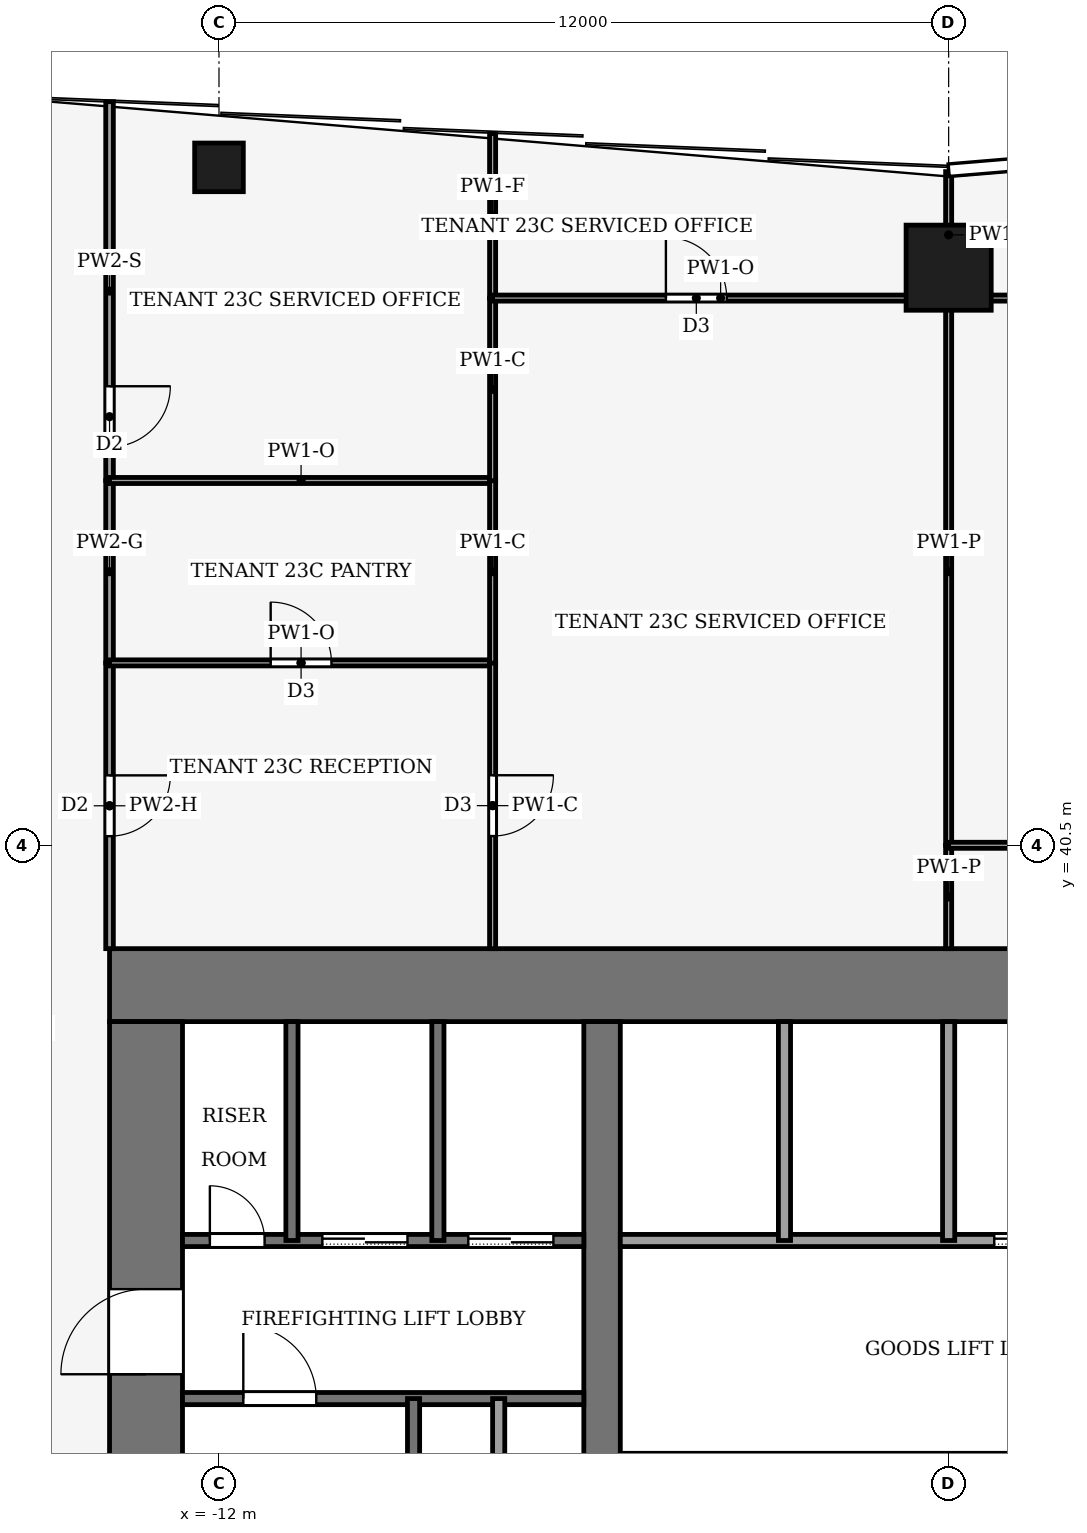
"""IFC4 building model, lengths in metres.
Left out: names, types, materials, properties, quantities, classifications, styles, units other than length and angle.
Written with IfcOpenShell. Run it as: python <this file> out.ifc"""

import sys

from ifc_helpers import new_model, si_unit, direction, frame, frame_2d, origin, origin_2d, place, context, subcontext, project, spatial, rectangle, hollow_rectangle, extrude, element, fill, save


model = new_model("IFC4")
c1 = context("Model", 3, precision=1e-05, world=origin(), true_north=direction((0.0, 1.0)))
c2 = subcontext(c1, "Body", "Model", "MODEL_VIEW")
j1 = project(units=[si_unit("LENGTHUNIT", "METRE"), si_unit("PLANEANGLEUNIT", "RADIAN")], contexts=[c1])
p1 = place(None, origin())
s1 = spatial("IfcSite", under=j1, at=p1, CompositionType="ELEMENT")
p2 = place(p1, origin())
s2 = spatial("IfcBuilding", under=s1, at=p2, CompositionType="ELEMENT")
p3 = place(p2, frame((0.0, 0.0, 102.0)))
s3 = spatial("IfcBuildingStorey", under=s2, at=p3, CompositionType="ELEMENT", Elevation=102.0)
p4 = place(p3, frame((-13.8, 38.2, -0.13), z_axis=(0.0, 0.0, 1.0), x_axis=(1.0, 0.0, 0.0)))
e1 = element("IfcWall", 1, at=p4, inside=s3, PredefinedType="SHEAR", context=c2, shape_type="SweptSolid", body=[
    extrude(rectangle(XDim=27.6, YDim=1.2, at=frame_2d((13.8, 0.0))), origin(), (0.0, 0.0, 1.0), 4.0),
])
p5 = place(p3, frame((-13.2, 18.4, -0.13), z_axis=(0.0, 0.0, 1.0), x_axis=(0.0, 1.0, 0.0)))
e2 = element("IfcWall", 2, at=p5, inside=s3, PredefinedType="SHEAR", context=c2, shape_type="SweptSolid", body=[
    extrude(rectangle(XDim=19.2, YDim=1.2, at=frame_2d((9.6, 0.0))), origin(), (0.0, 0.0, 1.0), 4.0),
])
p6 = place(p5, frame((2.8, 0.0, 0.13)))
e3 = element("IfcOpeningElement", 3, at=p6, cuts=e2, PredefinedType="OPENING", context=c2, shape_type="SweptSolid", body=[
    extrude(rectangle(XDim=2.4, YDim=2.4, at=frame_2d((1.2, 1.2))), frame((0.0, 0.61, 0.0), z_axis=(0.0, -1.0, 0.0), x_axis=(1.0, 0.0, 0.0)), (0.0, 0.0, 1.0), 1.22),
])
p7 = place(p5, frame((13.4, 0.0, 0.13)))
e4 = element("IfcOpeningElement", 4, at=p7, cuts=e2, PredefinedType="OPENING", context=c2, shape_type="SweptSolid", body=[
    extrude(rectangle(XDim=1.4, YDim=2.2, at=frame_2d((0.7, 1.1))), frame((0.0, 0.61, 0.0), z_axis=(0.0, -1.0, 0.0), x_axis=(1.0, 0.0, 0.0)), (0.0, 0.0, 1.0), 1.22),
])
p8 = place(p3, frame((-5.7, 18.4, -0.13), z_axis=(0.0, 0.0, 1.0), x_axis=(0.0, 1.0, 0.0)))
e5 = element("IfcWall", 5, at=p8, inside=s3, PredefinedType="SHEAR", context=c2, shape_type="SweptSolid", body=[
    extrude(rectangle(XDim=19.2, YDim=0.6, at=frame_2d((9.6, 0.0))), origin(), (0.0, 0.0, 1.0), 4.0),
])
p9 = place(p8, frame((8.35, 0.0, 0.13)))
e6 = element("IfcOpeningElement", 6, at=p9, cuts=e5, PredefinedType="OPENING", context=c2, shape_type="SweptSolid", body=[
    extrude(rectangle(XDim=0.9, YDim=2.1, at=frame_2d((0.45, 1.05))), frame((0.0, 0.31, 0.0), z_axis=(0.0, -1.0, 0.0), x_axis=(1.0, 0.0, 0.0)), (0.0, 0.0, 1.0), 0.62),
])
p10 = place(p3, frame((0.0, 50.0, 0.0), z_axis=(0.0, 0.0, 1.0), x_axis=(1.0, 0.0, 0.0)))
e7 = element("IfcColumn", 7, at=p10, inside=s3, PredefinedType="COLUMN", context=c2, shape_type="SweptSolid", body=[
    extrude(hollow_rectangle(XDim=1.4, YDim=1.4, WallThickness=0.08, at=origin_2d()), origin(), (0.0, 0.0, 1.0), 4.0),
])
p11 = place(p3, frame((-12.0, 51.65, 0.0), z_axis=(0.0, 0.0, 1.0), x_axis=(1.0, 0.0, 0.0)))
e8 = element("IfcColumn", 8, at=p11, inside=s3, PredefinedType="COLUMN", context=c2, shape_type="SweptSolid", body=[
    extrude(hollow_rectangle(XDim=0.8, YDim=0.8, WallThickness=0.04, at=origin_2d()), origin(), (0.0, 0.0, 1.0), 4.0),
])
p12 = place(p3, frame((-12.6, 31.4, 0.0), z_axis=(0.0, 0.0, 1.0), x_axis=(1.0, 0.0, 0.0)))
e9 = element("IfcWall", 9, at=p12, inside=s3, PredefinedType="PARTITIONING", context=c2, shape_type="SweptSolid", body=[
    extrude(rectangle(XDim=6.6, YDim=0.2, at=frame_2d((3.3, 0.0))), origin(), (0.0, 0.0, 1.0), 3.87),
])
p13 = place(p12, frame((1.0, 0.0, 0.0)))
e10 = element("IfcOpeningElement", 10, at=p13, cuts=e9, PredefinedType="OPENING", context=c2, shape_type="SweptSolid", body=[
    extrude(rectangle(XDim=1.2, YDim=2.2, at=frame_2d((0.6, 1.1))), frame((0.0, 0.11, 0.0), z_axis=(0.0, -1.0, 0.0), x_axis=(1.0, 0.0, 0.0)), (0.0, 0.0, 1.0), 0.22),
])
p14 = place(p3, frame((-12.6, 34.0, 0.0), z_axis=(0.0, 0.0, 1.0), x_axis=(1.0, 0.0, 0.0)))
e11 = element("IfcWall", 11, at=p14, inside=s3, PredefinedType="PARTITIONING", context=c2, shape_type="SweptSolid", body=[
    extrude(rectangle(XDim=6.6, YDim=0.2, at=frame_2d((3.3, 0.0))), origin(), (0.0, 0.0, 1.0), 3.87),
])
p15 = place(p14, frame((4.7, 0.0, 0.0)))
e12 = element("IfcOpeningElement", 12, at=p15, cuts=e11, PredefinedType="OPENING", context=c2, shape_type="SweptSolid", body=[
    extrude(rectangle(XDim=1.4, YDim=2.2, at=frame_2d((0.7, 1.1))), frame((0.0, 0.11, 0.0), z_axis=(0.0, -1.0, 0.0), x_axis=(1.0, 0.0, 0.0)), (0.0, 0.0, 1.0), 0.22),
])
p16 = place(p14, frame((2.3, 0.0, 0.0)))
e13 = element("IfcOpeningElement", 13, at=p16, cuts=e11, PredefinedType="OPENING", context=c2, shape_type="SweptSolid", body=[
    extrude(rectangle(XDim=1.4, YDim=2.2, at=frame_2d((0.7, 1.1))), frame((0.0, 0.11, 0.0), z_axis=(0.0, -1.0, 0.0), x_axis=(1.0, 0.0, 0.0)), (0.0, 0.0, 1.0), 0.22),
])
p17 = place(p14, frame((0.45, 0.0, 0.0)))
e14 = element("IfcOpeningElement", 14, at=p17, cuts=e11, PredefinedType="OPENING", context=c2, shape_type="SweptSolid", body=[
    extrude(rectangle(XDim=0.9, YDim=2.1, at=frame_2d((0.45, 1.05))), frame((0.0, 0.11, 0.0), z_axis=(0.0, -1.0, 0.0), x_axis=(1.0, 0.0, 0.0)), (0.0, 0.0, 1.0), 0.22),
])
p18 = place(p3, frame((-5.4, 34.0, 0.0), z_axis=(0.0, 0.0, 1.0), x_axis=(1.0, 0.0, 0.0)))
e15 = element("IfcWall", 15, at=p18, inside=s3, PredefinedType="PARTITIONING", context=c2, shape_type="SweptSolid", body=[
    extrude(rectangle(XDim=10.8, YDim=0.2, at=frame_2d((5.4, 0.0))), origin(), (0.0, 0.0, 1.0), 3.87),
])
p19 = place(p18, frame((6.15, 0.0, 0.0)))
e16 = element("IfcOpeningElement", 16, at=p19, cuts=e15, PredefinedType="OPENING", context=c2, shape_type="SweptSolid", body=[
    extrude(rectangle(XDim=1.2, YDim=2.2, at=frame_2d((0.6, 1.1))), frame((0.0, 0.11, 0.0), z_axis=(0.0, -1.0, 0.0), x_axis=(1.0, 0.0, 0.0)), (0.0, 0.0, 1.0), 0.22),
])
p20 = place(p18, frame((8.95, 0.0, 0.0)))
e17 = element("IfcOpeningElement", 17, at=p20, cuts=e15, PredefinedType="OPENING", context=c2, shape_type="SweptSolid", body=[
    extrude(rectangle(XDim=1.0, YDim=2.1, at=frame_2d((0.5, 1.05))), frame((0.0, 0.11, 0.0), z_axis=(0.0, -1.0, 0.0), x_axis=(1.0, 0.0, 0.0)), (0.0, 0.0, 1.0), 0.22),
])
p21 = place(p3, frame((-10.8, 34.0, 0.0), z_axis=(0.0, 0.0, 1.0), x_axis=(0.0, 1.0, 0.0)))
e18 = element("IfcWall", 18, at=p21, inside=s3, PredefinedType="PARTITIONING", context=c2, shape_type="SweptSolid", body=[
    extrude(rectangle(XDim=3.6, YDim=0.2, at=frame_2d((1.8, 0.0))), origin(), (0.0, 0.0, 1.0), 3.87),
])
p22 = place(p3, frame((-8.8, 24.0, 0.0), z_axis=(0.0, 0.0, 1.0), x_axis=(0.0, 1.0, 0.0)))
e19 = element("IfcWall", 19, at=p22, inside=s3, PredefinedType="PARTITIONING", context=c2, shape_type="SweptSolid", body=[
    extrude(rectangle(XDim=7.4, YDim=0.2, at=frame_2d((3.7, 0.0))), origin(), (0.0, 0.0, 1.0), 3.87),
])
p23 = place(p3, frame((-8.4, 34.0, 0.0), z_axis=(0.0, 0.0, 1.0), x_axis=(0.0, 1.0, 0.0)))
e20 = element("IfcWall", 20, at=p23, inside=s3, PredefinedType="PARTITIONING", context=c2, shape_type="SweptSolid", body=[
    extrude(rectangle(XDim=3.6, YDim=0.2, at=frame_2d((1.8, 0.0))), origin(), (0.0, 0.0, 1.0), 3.87),
])
p24 = place(p3, frame((-7.4, 24.0, 0.0), z_axis=(0.0, 0.0, 1.0), x_axis=(0.0, 1.0, 0.0)))
e21 = element("IfcWall", 21, at=p24, inside=s3, PredefinedType="PARTITIONING", context=c2, shape_type="SweptSolid", body=[
    extrude(rectangle(XDim=7.4, YDim=0.2, at=frame_2d((3.7, 0.0))), origin(), (0.0, 0.0, 1.0), 3.87),
])
for number, where, z_axis, x_axis in (
    (22, (-2.7, 34.0, 0.0), (0.0, 0.0, 1.0), (0.0, 1.0, 0.0)),
    (23, (0.0, 34.0, 0.0), (0.0, 0.0, 1.0), (0.0, 1.0, 0.0)),
):
    element("IfcWall", number, at=place(p3, frame(where, z_axis=z_axis, x_axis=x_axis)), inside=s3, PredefinedType="PARTITIONING", context=c2, shape_type="SweptSolid", body=[
        extrude(rectangle(XDim=3.6, YDim=0.2, at=frame_2d((1.8, 0.0))), origin(), (0.0, 0.0, 1.0), 3.87),
    ])
p25 = place(p3, frame((-13.8, 43.5, 0.0), z_axis=(0.0, 0.0, 1.0), x_axis=(0.0, -1.0, 0.0)))
e24 = element("IfcWall", 24, at=p25, inside=s3, PredefinedType="PARTITIONING", context=c2, shape_type="SweptSolid", body=[
    extrude(rectangle(XDim=4.7, YDim=0.125, at=frame_2d((2.35, 0.0))), origin(), (0.0, 0.0, 1.0), 3.14),
])
p26 = place(p25, frame((1.85, 0.0, 0.0)))
e25 = element("IfcOpeningElement", 25, at=p26, cuts=e24, PredefinedType="OPENING", context=c2, shape_type="SweptSolid", body=[
    extrude(rectangle(XDim=1.0, YDim=2.1, at=frame_2d((0.5, 1.05))), frame((0.0, 0.073, 0.0), z_axis=(0.0, -1.0, 0.0), x_axis=(1.0, 0.0, 0.0)), (0.0, 0.0, 1.0), 0.145),
])
p27 = place(p3, frame((-13.8, 43.5, 0.0), z_axis=(0.0, 0.0, 1.0), x_axis=(0.0, 1.0, 0.0)))
e26 = element("IfcWall", 26, at=p27, inside=s3, PredefinedType="PARTITIONING", context=c2, shape_type="SweptSolid", body=[
    extrude(rectangle(XDim=3.0, YDim=0.125, at=frame_2d((1.5, 0.0))), origin(), (0.0, 0.0, 1.0), 3.87),
])
p28 = place(p3, frame((-13.8, 52.73, 0.0), z_axis=(0.0, 0.0, 1.0), x_axis=(0.0, -1.0, 0.0)))
e27 = element("IfcWall", 27, at=p28, inside=s3, PredefinedType="PARTITIONING", context=c2, shape_type="SweptSolid", body=[
    extrude(rectangle(XDim=6.23, YDim=0.125, at=frame_2d((3.115, 0.0))), origin(), (0.0, 0.0, 1.0), 3.04),
])
p29 = place(p28, frame((4.68, 0.0, 0.0)))
e28 = element("IfcOpeningElement", 28, at=p29, cuts=e27, PredefinedType="OPENING", context=c2, shape_type="SweptSolid", body=[
    extrude(rectangle(XDim=1.0, YDim=2.1, at=frame_2d((0.5, 1.05))), frame((0.0, 0.073, 0.0), z_axis=(0.0, -1.0, 0.0), x_axis=(1.0, 0.0, 0.0)), (0.0, 0.0, 1.0), 0.145),
])
p30 = place(p3, frame((-13.8, 43.5, 0.0), z_axis=(0.0, 0.0, 1.0), x_axis=(1.0, 0.0, 0.0)))
e29 = element("IfcWall", 29, at=p30, inside=s3, PredefinedType="PARTITIONING", context=c2, shape_type="SweptSolid", body=[
    extrude(rectangle(XDim=6.3, YDim=0.1, at=frame_2d((3.15, 0.0))), origin(), (0.0, 0.0, 1.0), 3.39),
])
p31 = place(p30, frame((2.65, 0.0, 0.0)))
e30 = element("IfcOpeningElement", 30, at=p31, cuts=e29, PredefinedType="OPENING", context=c2, shape_type="SweptSolid", body=[
    extrude(rectangle(XDim=1.0, YDim=2.1, at=frame_2d((0.5, 1.05))), frame((0.0, 0.06, 0.0), z_axis=(0.0, -1.0, 0.0), x_axis=(1.0, 0.0, 0.0)), (0.0, 0.0, 1.0), 0.12),
])
p32 = place(p3, frame((-7.5, 43.504, 0.0), z_axis=(0.0, 0.0, 1.0), x_axis=(0.0, -1.0, 0.0)))
e31 = element("IfcWall", 31, at=p32, inside=s3, PredefinedType="PARTITIONING", context=c2, shape_type="SweptSolid", body=[
    extrude(rectangle(XDim=4.704, YDim=0.1, at=frame_2d((2.352, 0.0))), origin(), (0.0, 0.0, 1.0), 3.87),
])
p33 = place(p32, frame((1.852, 0.0, 0.0)))
e32 = element("IfcOpeningElement", 32, at=p33, cuts=e31, PredefinedType="OPENING", context=c2, shape_type="SweptSolid", body=[
    extrude(rectangle(XDim=1.0, YDim=2.1, at=frame_2d((0.5, 1.05))), frame((0.0, 0.06, 0.0), z_axis=(0.0, -1.0, 0.0), x_axis=(1.0, 0.0, 0.0)), (0.0, 0.0, 1.0), 0.12),
])
p34 = place(p3, frame((-7.5, 46.5, 0.0), z_axis=(0.0, 0.0, 1.0), x_axis=(-1.0, 0.0, 0.0)))
e33 = element("IfcWall", 33, at=p34, inside=s3, PredefinedType="PARTITIONING", context=c2, shape_type="SweptSolid", body=[
    extrude(rectangle(XDim=6.3, YDim=0.1, at=frame_2d((3.15, 0.0))), origin(), (0.0, 0.0, 1.0), 3.39),
])
p35 = place(p3, frame((-7.5, 43.496, 0.0), z_axis=(0.0, 0.0, 1.0), x_axis=(0.0, 1.0, 0.0)))
e34 = element("IfcWall", 34, at=p35, inside=s3, PredefinedType="PARTITIONING", context=c2, shape_type="SweptSolid", body=[
    extrude(rectangle(XDim=3.008, YDim=0.1, at=frame_2d((1.504, 0.0))), origin(), (0.0, 0.0, 1.0), 3.87),
])
p36 = place(p3, frame((-7.5, 46.496, 0.0), z_axis=(0.0, 0.0, 1.0), x_axis=(0.0, 1.0, 0.0)))
e35 = element("IfcWall", 35, at=p36, inside=s3, PredefinedType="PARTITIONING", context=c2, shape_type="SweptSolid", body=[
    extrude(rectangle(XDim=3.004, YDim=0.1, at=frame_2d((1.502, 0.0))), origin(), (0.0, 0.0, 1.0), 3.87),
])
p37 = place(p3, frame((-7.5, 49.5, 0.0), z_axis=(0.0, 0.0, 1.0), x_axis=(0.0, 1.0, 0.0)))
e36 = element("IfcWall", 36, at=p37, inside=s3, PredefinedType="PARTITIONING", context=c2, shape_type="SweptSolid", body=[
    extrude(rectangle(XDim=2.705, YDim=0.1, at=frame_2d((1.353, 0.0))), origin(), (0.0, 0.0, 1.0), 3.04),
])
p38 = place(p3, frame((-7.5, 49.5, 0.0), z_axis=(0.0, 0.0, 1.0), x_axis=(1.0, 0.0, 0.0)))
e37 = element("IfcWall", 37, at=p38, inside=s3, PredefinedType="PARTITIONING", context=c2, shape_type="SweptSolid", body=[
    extrude(rectangle(XDim=7.5, YDim=0.1, at=frame_2d((3.75, 0.0))), origin(), (0.0, 0.0, 1.0), 3.39),
])
p39 = place(p38, frame((2.85, 0.0, 0.0)))
e38 = element("IfcOpeningElement", 38, at=p39, cuts=e37, PredefinedType="OPENING", context=c2, shape_type="SweptSolid", body=[
    extrude(rectangle(XDim=1.0, YDim=2.1, at=frame_2d((0.5, 1.05))), frame((0.0, 0.06, 0.0), z_axis=(0.0, -1.0, 0.0), x_axis=(1.0, 0.0, 0.0)), (0.0, 0.0, 1.0), 0.12),
])
p40 = place(p3, frame((0.0, 38.8, 0.0), z_axis=(0.0, 0.0, 1.0), x_axis=(0.0, 1.0, 0.0)))
e39 = element("IfcWall", 39, at=p40, inside=s3, PredefinedType="PARTITIONING", context=c2, shape_type="SweptSolid", body=[
    extrude(rectangle(XDim=1.7, YDim=0.1, at=frame_2d((0.85, 0.0))), origin(), (0.0, 0.0, 1.0), 3.44),
])
p41 = place(p3, frame((0.0, 40.5, 0.0), z_axis=(0.0, 0.0, 1.0), x_axis=(0.0, 1.0, 0.0)))
e40 = element("IfcWall", 40, at=p41, inside=s3, PredefinedType="PARTITIONING", context=c2, shape_type="SweptSolid", body=[
    extrude(rectangle(XDim=9.0, YDim=0.1, at=frame_2d((4.5, 0.0))), origin(), (0.0, 0.0, 1.0), 3.44),
])
p42 = place(p3, frame((0.0, 49.5, 0.0), z_axis=(0.0, 0.0, 1.0), x_axis=(0.0, 1.0, 0.0)))
e41 = element("IfcWall", 41, at=p42, inside=s3, PredefinedType="PARTITIONING", context=c2, shape_type="SweptSolid", body=[
    extrude(rectangle(XDim=2.08, YDim=0.1, at=frame_2d((1.04, 0.0))), origin(), (0.0, 0.0, 1.0), 3.04),
])
p43 = place(p3, frame((10.5, 40.5, 0.0), z_axis=(0.0, 0.0, 1.0), x_axis=(-1.0, 0.0, 0.0)))
e42 = element("IfcWall", 42, at=p43, inside=s3, PredefinedType="PARTITIONING", context=c2, shape_type="SweptSolid", body=[
    extrude(rectangle(XDim=10.5, YDim=0.1, at=frame_2d((5.25, 0.0))), origin(), (0.0, 0.0, 1.0), 3.39),
])
p44 = place(p43, frame((4.75, 0.0, 0.0)))
e43 = element("IfcOpeningElement", 43, at=p44, cuts=e42, PredefinedType="OPENING", context=c2, shape_type="SweptSolid", body=[
    extrude(rectangle(XDim=1.0, YDim=2.1, at=frame_2d((0.5, 1.05))), frame((0.0, 0.06, 0.0), z_axis=(0.0, -1.0, 0.0), x_axis=(1.0, 0.0, 0.0)), (0.0, 0.0, 1.0), 0.12),
])
p45 = place(p3, frame((10.5, 49.5, 0.0), z_axis=(0.0, 0.0, 1.0), x_axis=(-1.0, 0.0, 0.0)))
e44 = element("IfcWall", 44, at=p45, inside=s3, PredefinedType="PARTITIONING", context=c2, shape_type="SweptSolid", body=[
    extrude(rectangle(XDim=10.5, YDim=0.1, at=frame_2d((5.25, 0.0))), origin(), (0.0, 0.0, 1.0), 3.39),
])
p46 = place(p19, origin())
e45 = element("IfcDoor", 45, at=p46, inside=s3, OperationType="SLIDING_TO_LEFT", PredefinedType="DOOR", context=c2, shape_type="SweptSolid", body=[
    extrude(rectangle(XDim=1.2, YDim=2.2, at=frame_2d((0.6, 1.1))), frame((0.0, 0.025, 0.0), z_axis=(0.0, -1.0, 0.0), x_axis=(1.0, 0.0, 0.0)), (0.0, 0.0, 1.0), 0.05),
])
fill(e16, e45)
p47 = place(p15, origin())
e46 = element("IfcDoor", 46, at=p47, inside=s3, OperationType="SLIDING_TO_LEFT", PredefinedType="DOOR", context=c2, shape_type="SweptSolid", body=[
    extrude(rectangle(XDim=1.4, YDim=2.2, at=frame_2d((0.7, 1.1))), frame((0.0, 0.025, 0.0), z_axis=(0.0, -1.0, 0.0), x_axis=(1.0, 0.0, 0.0)), (0.0, 0.0, 1.0), 0.05),
])
fill(e12, e46)
p48 = place(p16, origin())
e47 = element("IfcDoor", 47, at=p48, inside=s3, OperationType="SLIDING_TO_LEFT", PredefinedType="DOOR", context=c2, shape_type="SweptSolid", body=[
    extrude(rectangle(XDim=1.4, YDim=2.2, at=frame_2d((0.7, 1.1))), frame((0.0, 0.025, 0.0), z_axis=(0.0, -1.0, 0.0), x_axis=(1.0, 0.0, 0.0)), (0.0, 0.0, 1.0), 0.05),
])
fill(e13, e47)
p49 = place(p17, origin())
e48 = element("IfcDoor", 48, at=p49, inside=s3, OperationType="SINGLE_SWING_RIGHT", PredefinedType="DOOR", context=c2, shape_type="SweptSolid", body=[
    extrude(rectangle(XDim=0.9, YDim=2.1, at=frame_2d((0.45, 1.05))), frame((0.0, 0.025, 0.0), z_axis=(0.0, -1.0, 0.0), x_axis=(1.0, 0.0, 0.0)), (0.0, 0.0, 1.0), 0.05),
])
fill(e14, e48)
p50 = place(p13, origin())
e49 = element("IfcDoor", 49, at=p50, inside=s3, OperationType="SINGLE_SWING_RIGHT", PredefinedType="DOOR", context=c2, shape_type="SweptSolid", body=[
    extrude(rectangle(XDim=1.2, YDim=2.2, at=frame_2d((0.6, 1.1))), frame((0.0, 0.025, 0.0), z_axis=(0.0, -1.0, 0.0), x_axis=(1.0, 0.0, 0.0)), (0.0, 0.0, 1.0), 0.05),
])
fill(e10, e49)
p51 = place(p7, origin())
e50 = element("IfcDoor", 50, at=p51, inside=s3, OperationType="SINGLE_SWING_RIGHT", PredefinedType="DOOR", context=c2, shape_type="SweptSolid", body=[
    extrude(rectangle(XDim=1.4, YDim=2.2, at=frame_2d((0.7, 1.1))), frame((0.0, 0.025, 0.0), z_axis=(0.0, -1.0, 0.0), x_axis=(1.0, 0.0, 0.0)), (0.0, 0.0, 1.0), 0.05),
])
fill(e4, e50)
p52 = place(p26, origin())
e51 = element("IfcDoor", 51, at=p52, inside=s3, OperationType="SINGLE_SWING_LEFT", PredefinedType="DOOR", context=c2, shape_type="SweptSolid", body=[
    extrude(rectangle(XDim=1.0, YDim=2.1, at=frame_2d((0.5, 1.05))), frame((0.0, 0.025, 0.0), z_axis=(0.0, -1.0, 0.0), x_axis=(1.0, 0.0, 0.0)), (0.0, 0.0, 1.0), 0.05),
])
fill(e25, e51)
p53 = place(p29, origin())
e52 = element("IfcDoor", 52, at=p53, inside=s3, OperationType="SINGLE_SWING_RIGHT", PredefinedType="DOOR", context=c2, shape_type="SweptSolid", body=[
    extrude(rectangle(XDim=1.0, YDim=2.1, at=frame_2d((0.5, 1.05))), frame((0.0, 0.025, 0.0), z_axis=(0.0, -1.0, 0.0), x_axis=(1.0, 0.0, 0.0)), (0.0, 0.0, 1.0), 0.05),
])
fill(e28, e52)
p54 = place(p31, origin())
e53 = element("IfcDoor", 53, at=p54, inside=s3, OperationType="SINGLE_SWING_LEFT", PredefinedType="DOOR", context=c2, shape_type="SweptSolid", body=[
    extrude(rectangle(XDim=1.0, YDim=2.1, at=frame_2d((0.5, 1.05))), frame((0.0, 0.025, 0.0), z_axis=(0.0, -1.0, 0.0), x_axis=(1.0, 0.0, 0.0)), (0.0, 0.0, 1.0), 0.05),
])
fill(e30, e53)
p55 = place(p33, origin())
e54 = element("IfcDoor", 54, at=p55, inside=s3, OperationType="SINGLE_SWING_RIGHT", PredefinedType="DOOR", context=c2, shape_type="SweptSolid", body=[
    extrude(rectangle(XDim=1.0, YDim=2.1, at=frame_2d((0.5, 1.05))), frame((0.0, 0.025, 0.0), z_axis=(0.0, -1.0, 0.0), x_axis=(1.0, 0.0, 0.0)), (0.0, 0.0, 1.0), 0.05),
])
fill(e32, e54)
p56 = place(p39, origin())
e55 = element("IfcDoor", 55, at=p56, inside=s3, OperationType="SINGLE_SWING_LEFT", PredefinedType="DOOR", context=c2, shape_type="SweptSolid", body=[
    extrude(rectangle(XDim=1.0, YDim=2.1, at=frame_2d((0.5, 1.05))), frame((0.0, 0.025, 0.0), z_axis=(0.0, -1.0, 0.0), x_axis=(1.0, 0.0, 0.0)), (0.0, 0.0, 1.0), 0.05),
])
fill(e38, e55)
save(model, sys.argv[1])
